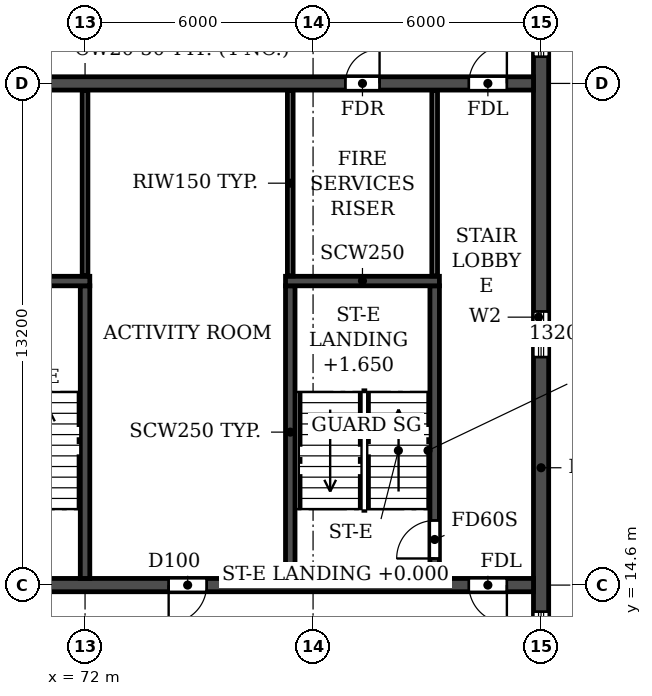
"""IFC4 building model, lengths in metres.
Left out: names, types, materials, properties, quantities, classifications, styles, units other than length and angle.
Written with IfcOpenShell. Run it as: python <this file> out.ifc"""

import sys

from ifc_helpers import new_model, si_unit, direction, frame, frame_2d, origin, place, context, subcontext, project, spatial, rectangle, extrude, element, fill, save


model = new_model("IFC4")
c1 = context("Model", 3, precision=1e-05, world=origin(), true_north=direction((0.0, 1.0)))
c2 = subcontext(c1, "Body", "Model", "MODEL_VIEW")
j1 = project(units=[si_unit("LENGTHUNIT", "METRE"), si_unit("PLANEANGLEUNIT", "RADIAN")], contexts=[c1])
p1 = place(None, origin())
s1 = spatial("IfcSite", under=j1, at=p1, CompositionType="ELEMENT")
p2 = place(p1, origin())
s2 = spatial("IfcBuilding", under=s1, at=p2, CompositionType="ELEMENT")
p3 = place(p2, frame((0.0, 0.0, 241.2)))
s3 = spatial("IfcBuildingStorey", under=s2, at=p3, CompositionType="ELEMENT", Elevation=241.2)
p4 = place(p3, frame((84.0, 4.683, 0.0), z_axis=(0.0, 0.0, 1.0), x_axis=(0.0, 1.0, 0.0)))
e1 = element("IfcWall", 1, at=p4, inside=s3, PredefinedType="SHEAR", context=c2, shape_type="SweptSolid", body=[
    extrude(rectangle(XDim=31.834, YDim=0.4, at=frame_2d((15.917, 0.0))), origin(), (0.0, 0.0, 1.0), 3.08),
])
p5 = place(p4, frame((23.817, 0.0, 0.9)))
e2 = element("IfcOpeningElement", 2, at=p5, cuts=e1, PredefinedType="OPENING", context=c2, shape_type="SweptSolid", body=[
    extrude(rectangle(XDim=1.2, YDim=1.5, at=frame_2d((0.6, 0.75))), frame((0.0, 0.21, 0.0), z_axis=(0.0, -1.0, 0.0), x_axis=(1.0, 0.0, 0.0)), (0.0, 0.0, 1.0), 0.42),
])
p6 = place(p4, frame((8.017, 0.0, 0.9)))
e3 = element("IfcOpeningElement", 3, at=p6, cuts=e1, PredefinedType="OPENING", context=c2, shape_type="SweptSolid", body=[
    extrude(rectangle(XDim=1.2, YDim=1.5, at=frame_2d((0.6, 0.75))), frame((0.0, 0.21, 0.0), z_axis=(0.0, -1.0, 0.0), x_axis=(1.0, 0.0, 0.0)), (0.0, 0.0, 1.0), 0.42),
])
p7 = place(p4, frame((27.694, 0.0, 0.6)))
e4 = element("IfcOpeningElement", 4, at=p7, cuts=e1, PredefinedType="OPENING", context=c2, shape_type="SweptSolid", body=[
    extrude(rectangle(XDim=2.2, YDim=1.8, at=frame_2d((1.1, 0.9))), frame((0.0, 0.21, 0.0), z_axis=(0.0, -1.0, 0.0), x_axis=(1.0, 0.0, 0.0)), (0.0, 0.0, 1.0), 0.42),
])
p8 = place(p4, frame((2.541, 0.0, 0.6)))
e5 = element("IfcOpeningElement", 5, at=p8, cuts=e1, PredefinedType="OPENING", context=c2, shape_type="SweptSolid", body=[
    extrude(rectangle(XDim=2.2, YDim=1.8, at=frame_2d((1.1, 0.9))), frame((0.0, 0.21, 0.0), z_axis=(0.0, -1.0, 0.0), x_axis=(1.0, 0.0, 0.0)), (0.0, 0.0, 1.0), 0.42),
])
p9 = place(p4, frame((15.917, 0.0, 0.9)))
e6 = element("IfcOpeningElement", 6, at=p9, cuts=e1, PredefinedType="OPENING", context=c2, shape_type="SweptSolid", body=[
    extrude(rectangle(XDim=1.2, YDim=1.5, at=frame_2d((0.6, 0.75))), frame((0.0, 0.21, 0.0), z_axis=(0.0, -1.0, 0.0), x_axis=(1.0, 0.0, 0.0)), (0.0, 0.0, 1.0), 0.42),
])
p10 = place(p3, frame((18.2, 14.6, 0.0), z_axis=(0.0, 0.0, 1.0), x_axis=(1.0, 0.0, 0.0)))
e7 = element("IfcWall", 7, at=p10, inside=s3, PredefinedType="SOLIDWALL", context=c2, shape_type="SweptSolid", body=[
    extrude(rectangle(XDim=65.6, YDim=0.35, at=frame_2d((32.8, 0.0))), origin(), (0.0, 0.0, 1.0), 3.08),
])
p11 = place(p10, frame((0.7, 0.0, 0.0)))
e8 = element("IfcOpeningElement", 8, at=p11, cuts=e7, PredefinedType="OPENING", context=c2, shape_type="SweptSolid", body=[
    extrude(rectangle(XDim=1.0, YDim=2.1, at=frame_2d((0.5, 1.05))), frame((0.0, 0.185, 0.0), z_axis=(0.0, -1.0, 0.0), x_axis=(1.0, 0.0, 0.0)), (0.0, 0.0, 1.0), 0.37),
])
p12 = place(p10, frame((8.6, 0.0, 0.0)))
e9 = element("IfcOpeningElement", 9, at=p12, cuts=e7, PredefinedType="OPENING", context=c2, shape_type="SweptSolid", body=[
    extrude(rectangle(XDim=1.0, YDim=2.1, at=frame_2d((0.5, 1.05))), frame((0.0, 0.185, 0.0), z_axis=(0.0, -1.0, 0.0), x_axis=(1.0, 0.0, 0.0)), (0.0, 0.0, 1.0), 0.37),
])
p13 = place(p10, frame((13.2, 0.0, 0.0)))
e10 = element("IfcOpeningElement", 10, at=p13, cuts=e7, PredefinedType="OPENING", context=c2, shape_type="SweptSolid", body=[
    extrude(rectangle(XDim=1.0, YDim=2.1, at=frame_2d((0.5, 1.05))), frame((0.0, 0.185, 0.0), z_axis=(0.0, -1.0, 0.0), x_axis=(1.0, 0.0, 0.0)), (0.0, 0.0, 1.0), 0.37),
])
p14 = place(p10, frame((25.8, 0.0, 0.0)))
e11 = element("IfcOpeningElement", 11, at=p14, cuts=e7, PredefinedType="OPENING", context=c2, shape_type="SweptSolid", body=[
    extrude(rectangle(XDim=1.0, YDim=2.1, at=frame_2d((0.5, 1.05))), frame((0.0, 0.185, 0.0), z_axis=(0.0, -1.0, 0.0), x_axis=(1.0, 0.0, 0.0)), (0.0, 0.0, 1.0), 0.37),
])
p15 = place(p10, frame((29.7, 0.0, 0.0)))
e12 = element("IfcOpeningElement", 12, at=p15, cuts=e7, PredefinedType="OPENING", context=c2, shape_type="SweptSolid", body=[
    extrude(rectangle(XDim=1.0, YDim=2.1, at=frame_2d((0.5, 1.05))), frame((0.0, 0.185, 0.0), z_axis=(0.0, -1.0, 0.0), x_axis=(1.0, 0.0, 0.0)), (0.0, 0.0, 1.0), 0.37),
])
p16 = place(p10, frame((32.3, 0.0, 0.0)))
e13 = element("IfcOpeningElement", 13, at=p16, cuts=e7, PredefinedType="OPENING", context=c2, shape_type="SweptSolid", body=[
    extrude(rectangle(XDim=1.0, YDim=2.1, at=frame_2d((0.5, 1.05))), frame((0.0, 0.185, 0.0), z_axis=(0.0, -1.0, 0.0), x_axis=(1.0, 0.0, 0.0)), (0.0, 0.0, 1.0), 0.37),
])
p17 = place(p10, frame((37.5, 0.0, 0.0)))
e14 = element("IfcOpeningElement", 14, at=p17, cuts=e7, PredefinedType="OPENING", context=c2, shape_type="SweptSolid", body=[
    extrude(rectangle(XDim=1.0, YDim=2.1, at=frame_2d((0.5, 1.05))), frame((0.0, 0.185, 0.0), z_axis=(0.0, -1.0, 0.0), x_axis=(1.0, 0.0, 0.0)), (0.0, 0.0, 1.0), 0.37),
])
p18 = place(p10, frame((51.4, 0.0, 0.0)))
e15 = element("IfcOpeningElement", 15, at=p18, cuts=e7, PredefinedType="OPENING", context=c2, shape_type="SweptSolid", body=[
    extrude(rectangle(XDim=1.0, YDim=2.1, at=frame_2d((0.5, 1.05))), frame((0.0, 0.185, 0.0), z_axis=(0.0, -1.0, 0.0), x_axis=(1.0, 0.0, 0.0)), (0.0, 0.0, 1.0), 0.37),
])
p19 = place(p10, frame((56.0, 0.0, 0.0)))
e16 = element("IfcOpeningElement", 16, at=p19, cuts=e7, PredefinedType="OPENING", context=c2, shape_type="SweptSolid", body=[
    extrude(rectangle(XDim=1.0, YDim=2.1, at=frame_2d((0.5, 1.05))), frame((0.0, 0.185, 0.0), z_axis=(0.0, -1.0, 0.0), x_axis=(1.0, 0.0, 0.0)), (0.0, 0.0, 1.0), 0.37),
])
p20 = place(p10, frame((63.9, 0.0, 0.0)))
e17 = element("IfcOpeningElement", 17, at=p20, cuts=e7, PredefinedType="OPENING", context=c2, shape_type="SweptSolid", body=[
    extrude(rectangle(XDim=1.0, YDim=2.1, at=frame_2d((0.5, 1.05))), frame((0.0, 0.185, 0.0), z_axis=(0.0, -1.0, 0.0), x_axis=(1.0, 0.0, 0.0)), (0.0, 0.0, 1.0), 0.37),
])
p21 = place(p3, frame((18.2, 27.8, 0.0), z_axis=(0.0, 0.0, 1.0), x_axis=(1.0, 0.0, 0.0)))
e18 = element("IfcWall", 18, at=p21, inside=s3, PredefinedType="SOLIDWALL", context=c2, shape_type="SweptSolid", body=[
    extrude(rectangle(XDim=65.6, YDim=0.35, at=frame_2d((32.8, 0.0))), origin(), (0.0, 0.0, 1.0), 3.08),
])
p22 = place(p21, frame((0.7, 0.0, 0.0)))
e19 = element("IfcOpeningElement", 19, at=p22, cuts=e18, PredefinedType="OPENING", context=c2, shape_type="SweptSolid", body=[
    extrude(rectangle(XDim=1.0, YDim=2.1, at=frame_2d((0.5, 1.05))), frame((0.0, 0.185, 0.0), z_axis=(0.0, -1.0, 0.0), x_axis=(1.0, 0.0, 0.0)), (0.0, 0.0, 1.0), 0.37),
])
p23 = place(p21, frame((4.05, 0.0, 0.0)))
e20 = element("IfcOpeningElement", 20, at=p23, cuts=e18, PredefinedType="OPENING", context=c2, shape_type="SweptSolid", body=[
    extrude(rectangle(XDim=0.9, YDim=2.1, at=frame_2d((0.45, 1.05))), frame((0.0, 0.185, 0.0), z_axis=(0.0, -1.0, 0.0), x_axis=(1.0, 0.0, 0.0)), (0.0, 0.0, 1.0), 0.37),
])
p24 = place(p21, frame((13.25, 0.0, 0.0)))
e21 = element("IfcOpeningElement", 21, at=p24, cuts=e18, PredefinedType="OPENING", context=c2, shape_type="SweptSolid", body=[
    extrude(rectangle(XDim=0.9, YDim=2.1, at=frame_2d((0.45, 1.05))), frame((0.0, 0.185, 0.0), z_axis=(0.0, -1.0, 0.0), x_axis=(1.0, 0.0, 0.0)), (0.0, 0.0, 1.0), 0.37),
])
p25 = place(p21, frame((17.7, 0.0, 0.0)))
e22 = element("IfcOpeningElement", 22, at=p25, cuts=e18, PredefinedType="OPENING", context=c2, shape_type="SweptSolid", body=[
    extrude(rectangle(XDim=1.0, YDim=2.1, at=frame_2d((0.5, 1.05))), frame((0.0, 0.185, 0.0), z_axis=(0.0, -1.0, 0.0), x_axis=(1.0, 0.0, 0.0)), (0.0, 0.0, 1.0), 0.37),
])
p26 = place(p21, frame((22.9, 0.0, 0.0)))
e23 = element("IfcOpeningElement", 23, at=p26, cuts=e18, PredefinedType="OPENING", context=c2, shape_type="SweptSolid", body=[
    extrude(rectangle(XDim=1.0, YDim=2.1, at=frame_2d((0.5, 1.05))), frame((0.0, 0.185, 0.0), z_axis=(0.0, -1.0, 0.0), x_axis=(1.0, 0.0, 0.0)), (0.0, 0.0, 1.0), 0.37),
])
p27 = place(p21, frame((29.4, 0.0, 0.0)))
e24 = element("IfcOpeningElement", 24, at=p27, cuts=e18, PredefinedType="OPENING", context=c2, shape_type="SweptSolid", body=[
    extrude(rectangle(XDim=1.0, YDim=2.1, at=frame_2d((0.5, 1.05))), frame((0.0, 0.185, 0.0), z_axis=(0.0, -1.0, 0.0), x_axis=(1.0, 0.0, 0.0)), (0.0, 0.0, 1.0), 0.37),
])
p28 = place(p21, frame((32.3, 0.0, 0.0)))
e25 = element("IfcOpeningElement", 25, at=p28, cuts=e18, PredefinedType="OPENING", context=c2, shape_type="SweptSolid", body=[
    extrude(rectangle(XDim=1.0, YDim=2.1, at=frame_2d((0.5, 1.05))), frame((0.0, 0.185, 0.0), z_axis=(0.0, -1.0, 0.0), x_axis=(1.0, 0.0, 0.0)), (0.0, 0.0, 1.0), 0.37),
])
p29 = place(p21, frame((36.5, 0.0, 0.0)))
e26 = element("IfcOpeningElement", 26, at=p29, cuts=e18, PredefinedType="OPENING", context=c2, shape_type="SweptSolid", body=[
    extrude(rectangle(XDim=1.0, YDim=2.1, at=frame_2d((0.5, 1.05))), frame((0.0, 0.185, 0.0), z_axis=(0.0, -1.0, 0.0), x_axis=(1.0, 0.0, 0.0)), (0.0, 0.0, 1.0), 0.37),
])
p30 = place(p21, frame((41.7, 0.0, 0.0)))
e27 = element("IfcOpeningElement", 27, at=p30, cuts=e18, PredefinedType="OPENING", context=c2, shape_type="SweptSolid", body=[
    extrude(rectangle(XDim=1.0, YDim=2.1, at=frame_2d((0.5, 1.05))), frame((0.0, 0.185, 0.0), z_axis=(0.0, -1.0, 0.0), x_axis=(1.0, 0.0, 0.0)), (0.0, 0.0, 1.0), 0.37),
])
p31 = place(p21, frame((45.6, 0.0, 0.0)))
e28 = element("IfcOpeningElement", 28, at=p31, cuts=e18, PredefinedType="OPENING", context=c2, shape_type="SweptSolid", body=[
    extrude(rectangle(XDim=1.0, YDim=2.1, at=frame_2d((0.5, 1.05))), frame((0.0, 0.185, 0.0), z_axis=(0.0, -1.0, 0.0), x_axis=(1.0, 0.0, 0.0)), (0.0, 0.0, 1.0), 0.37),
])
p32 = place(p21, frame((48.2, 0.0, 0.0)))
e29 = element("IfcOpeningElement", 29, at=p32, cuts=e18, PredefinedType="OPENING", context=c2, shape_type="SweptSolid", body=[
    extrude(rectangle(XDim=1.0, YDim=2.1, at=frame_2d((0.5, 1.05))), frame((0.0, 0.185, 0.0), z_axis=(0.0, -1.0, 0.0), x_axis=(1.0, 0.0, 0.0)), (0.0, 0.0, 1.0), 0.37),
])
p33 = place(p21, frame((51.45, 0.0, 0.0)))
e30 = element("IfcOpeningElement", 30, at=p33, cuts=e18, PredefinedType="OPENING", context=c2, shape_type="SweptSolid", body=[
    extrude(rectangle(XDim=0.9, YDim=2.1, at=frame_2d((0.45, 1.05))), frame((0.0, 0.185, 0.0), z_axis=(0.0, -1.0, 0.0), x_axis=(1.0, 0.0, 0.0)), (0.0, 0.0, 1.0), 0.37),
])
p34 = place(p21, frame((60.65, 0.0, 0.0)))
e31 = element("IfcOpeningElement", 31, at=p34, cuts=e18, PredefinedType="OPENING", context=c2, shape_type="SweptSolid", body=[
    extrude(rectangle(XDim=0.9, YDim=2.1, at=frame_2d((0.45, 1.05))), frame((0.0, 0.185, 0.0), z_axis=(0.0, -1.0, 0.0), x_axis=(1.0, 0.0, 0.0)), (0.0, 0.0, 1.0), 0.37),
])
p35 = place(p21, frame((63.9, 0.0, 0.0)))
e32 = element("IfcOpeningElement", 32, at=p35, cuts=e18, PredefinedType="OPENING", context=c2, shape_type="SweptSolid", body=[
    extrude(rectangle(XDim=1.0, YDim=2.1, at=frame_2d((0.5, 1.05))), frame((0.0, 0.185, 0.0), z_axis=(0.0, -1.0, 0.0), x_axis=(1.0, 0.0, 0.0)), (0.0, 0.0, 1.0), 0.37),
])
p36 = place(p3, frame((72.0, 14.775, 0.0), z_axis=(0.0, 0.0, 1.0), x_axis=(0.0, 1.0, 0.0)))
e33 = element("IfcWall", 33, at=p36, inside=s3, PredefinedType="SOLIDWALL", context=c2, shape_type="SweptSolid", body=[
    extrude(rectangle(XDim=7.7, YDim=0.25, at=frame_2d((3.85, 0.0))), origin(), (0.0, 0.0, 1.0), 3.08),
])
p37 = place(p3, frame((68.075, 22.6, 0.0), z_axis=(0.0, 0.0, 1.0), x_axis=(1.0, 0.0, 0.0)))
e34 = element("IfcWall", 34, at=p37, inside=s3, PredefinedType="SOLIDWALL", context=c2, shape_type="SweptSolid", body=[
    extrude(rectangle(XDim=4.05, YDim=0.25, at=frame_2d((2.025, 0.0))), origin(), (0.0, 0.0, 1.0), 3.08),
])
p38 = place(p3, frame((77.4, 14.775, 0.0), z_axis=(0.0, 0.0, 1.0), x_axis=(0.0, 1.0, 0.0)))
e35 = element("IfcWall", 35, at=p38, inside=s3, PredefinedType="SOLIDWALL", context=c2, shape_type="SweptSolid", body=[
    extrude(rectangle(XDim=7.7, YDim=0.25, at=frame_2d((3.85, 0.0))), origin(), (0.0, 0.0, 1.0), 3.08),
])
p39 = place(p3, frame((81.2, 14.775, 0.0), z_axis=(0.0, 0.0, 1.0), x_axis=(0.0, 1.0, 0.0)))
e36 = element("IfcWall", 36, at=p39, inside=s3, PredefinedType="SOLIDWALL", context=c2, shape_type="SweptSolid", body=[
    extrude(rectangle(XDim=7.7, YDim=0.25, at=frame_2d((3.85, 0.0))), origin(), (0.0, 0.0, 1.0), 3.08),
])
p40 = place(p39, frame((0.525, 0.0, 0.0)))
e37 = element("IfcOpeningElement", 37, at=p40, cuts=e36, PredefinedType="OPENING", context=c2, shape_type="SweptSolid", body=[
    extrude(rectangle(XDim=1.0, YDim=2.1, at=frame_2d((0.5, 1.05))), frame((0.0, 0.135, 0.0), z_axis=(0.0, -1.0, 0.0), x_axis=(1.0, 0.0, 0.0)), (0.0, 0.0, 1.0), 0.27),
])
p41 = place(p3, frame((77.275, 22.6, 0.0), z_axis=(0.0, 0.0, 1.0), x_axis=(1.0, 0.0, 0.0)))
e38 = element("IfcWall", 38, at=p41, inside=s3, PredefinedType="SOLIDWALL", context=c2, shape_type="SweptSolid", body=[
    extrude(rectangle(XDim=4.05, YDim=0.25, at=frame_2d((2.025, 0.0))), origin(), (0.0, 0.0, 1.0), 3.08),
])
for number, where, z_axis, x_axis in (
    (39, (72.0, 22.735, 0.0), (0.0, 0.0, 1.0), (0.0, 1.0, 0.0)),
    (40, (77.4, 22.735, 0.0), (0.0, 0.0, 1.0), (0.0, 1.0, 0.0)),
    (41, (81.2, 22.735, 0.0), (0.0, 0.0, 1.0), (0.0, 1.0, 0.0)),
):
    element("IfcWall", number, at=place(p3, frame(where, z_axis=z_axis, x_axis=x_axis)), inside=s3, PredefinedType="PARTITIONING", context=c2, shape_type="SweptSolid", body=[
        extrude(rectangle(XDim=4.88, YDim=0.15, at=frame_2d((2.44, 0.0))), origin(), (0.0, 0.0, 1.0), 3.08),
    ])
p42 = place(p5, origin())
e42 = element("IfcWindow", 42, at=p42, inside=s3, PartitioningType="SINGLE_PANEL", PredefinedType="WINDOW", context=c2, shape_type="SweptSolid", body=[
    extrude(rectangle(XDim=1.2, YDim=1.5, at=frame_2d((0.6, 0.75))), frame((0.0, 0.03, 0.0), z_axis=(0.0, -1.0, 0.0), x_axis=(1.0, 0.0, 0.0)), (0.0, 0.0, 1.0), 0.06),
])
fill(e2, e42)
p43 = place(p6, origin())
e43 = element("IfcWindow", 43, at=p43, inside=s3, PartitioningType="SINGLE_PANEL", PredefinedType="WINDOW", context=c2, shape_type="SweptSolid", body=[
    extrude(rectangle(XDim=1.2, YDim=1.5, at=frame_2d((0.6, 0.75))), frame((0.0, 0.03, 0.0), z_axis=(0.0, -1.0, 0.0), x_axis=(1.0, 0.0, 0.0)), (0.0, 0.0, 1.0), 0.06),
])
fill(e3, e43)
p44 = place(p9, origin())
e44 = element("IfcWindow", 44, at=p44, inside=s3, PartitioningType="SINGLE_PANEL", PredefinedType="WINDOW", context=c2, shape_type="SweptSolid", body=[
    extrude(rectangle(XDim=1.2, YDim=1.5, at=frame_2d((0.6, 0.75))), frame((0.0, 0.03, 0.0), z_axis=(0.0, -1.0, 0.0), x_axis=(1.0, 0.0, 0.0)), (0.0, 0.0, 1.0), 0.06),
])
fill(e6, e44)
p45 = place(p34, origin())
e45 = element("IfcDoor", 45, at=p45, inside=s3, OperationType="SINGLE_SWING_RIGHT", PredefinedType="DOOR", context=c2, shape_type="SweptSolid", body=[
    extrude(rectangle(XDim=0.9, YDim=2.1, at=frame_2d((0.45, 1.05))), frame((0.0, 0.025, 0.0), z_axis=(0.0, -1.0, 0.0), x_axis=(1.0, 0.0, 0.0)), (0.0, 0.0, 1.0), 0.05),
])
fill(e31, e45)
p46 = place(p35, origin())
e46 = element("IfcDoor", 46, at=p46, inside=s3, OperationType="SINGLE_SWING_RIGHT", PredefinedType="DOOR", context=c2, shape_type="SweptSolid", body=[
    extrude(rectangle(XDim=1.0, YDim=2.1, at=frame_2d((0.5, 1.05))), frame((0.0, 0.025, 0.0), z_axis=(0.0, -1.0, 0.0), x_axis=(1.0, 0.0, 0.0)), (0.0, 0.0, 1.0), 0.05),
])
fill(e32, e46)
p47 = place(p19, frame((1.0, 0.0, 0.0), z_axis=(0.0, 0.0, 1.0), x_axis=(-1.0, 0.0, 0.0)))
e47 = element("IfcDoor", 47, at=p47, inside=s3, OperationType="SINGLE_SWING_RIGHT", PredefinedType="DOOR", context=c2, shape_type="SweptSolid", body=[
    extrude(rectangle(XDim=1.0, YDim=2.1, at=frame_2d((0.5, 1.05))), frame((0.0, 0.025, 0.0), z_axis=(0.0, -1.0, 0.0), x_axis=(1.0, 0.0, 0.0)), (0.0, 0.0, 1.0), 0.05),
])
fill(e16, e47)
p48 = place(p20, frame((1.0, 0.0, 0.0), z_axis=(0.0, 0.0, 1.0), x_axis=(-1.0, 0.0, 0.0)))
e48 = element("IfcDoor", 48, at=p48, inside=s3, OperationType="SINGLE_SWING_LEFT", PredefinedType="DOOR", context=c2, shape_type="SweptSolid", body=[
    extrude(rectangle(XDim=1.0, YDim=2.1, at=frame_2d((0.5, 1.05))), frame((0.0, 0.025, 0.0), z_axis=(0.0, -1.0, 0.0), x_axis=(1.0, 0.0, 0.0)), (0.0, 0.0, 1.0), 0.05),
])
fill(e17, e48)
p49 = place(p40, origin())
e49 = element("IfcDoor", 49, at=p49, inside=s3, OperationType="SINGLE_SWING_LEFT", PredefinedType="DOOR", context=c2, shape_type="SweptSolid", body=[
    extrude(rectangle(XDim=1.0, YDim=2.1, at=frame_2d((0.5, 1.05))), frame((0.0, 0.025, 0.0), z_axis=(0.0, -1.0, 0.0), x_axis=(1.0, 0.0, 0.0)), (0.0, 0.0, 1.0), 0.05),
])
fill(e37, e49)
save(model, sys.argv[1])
